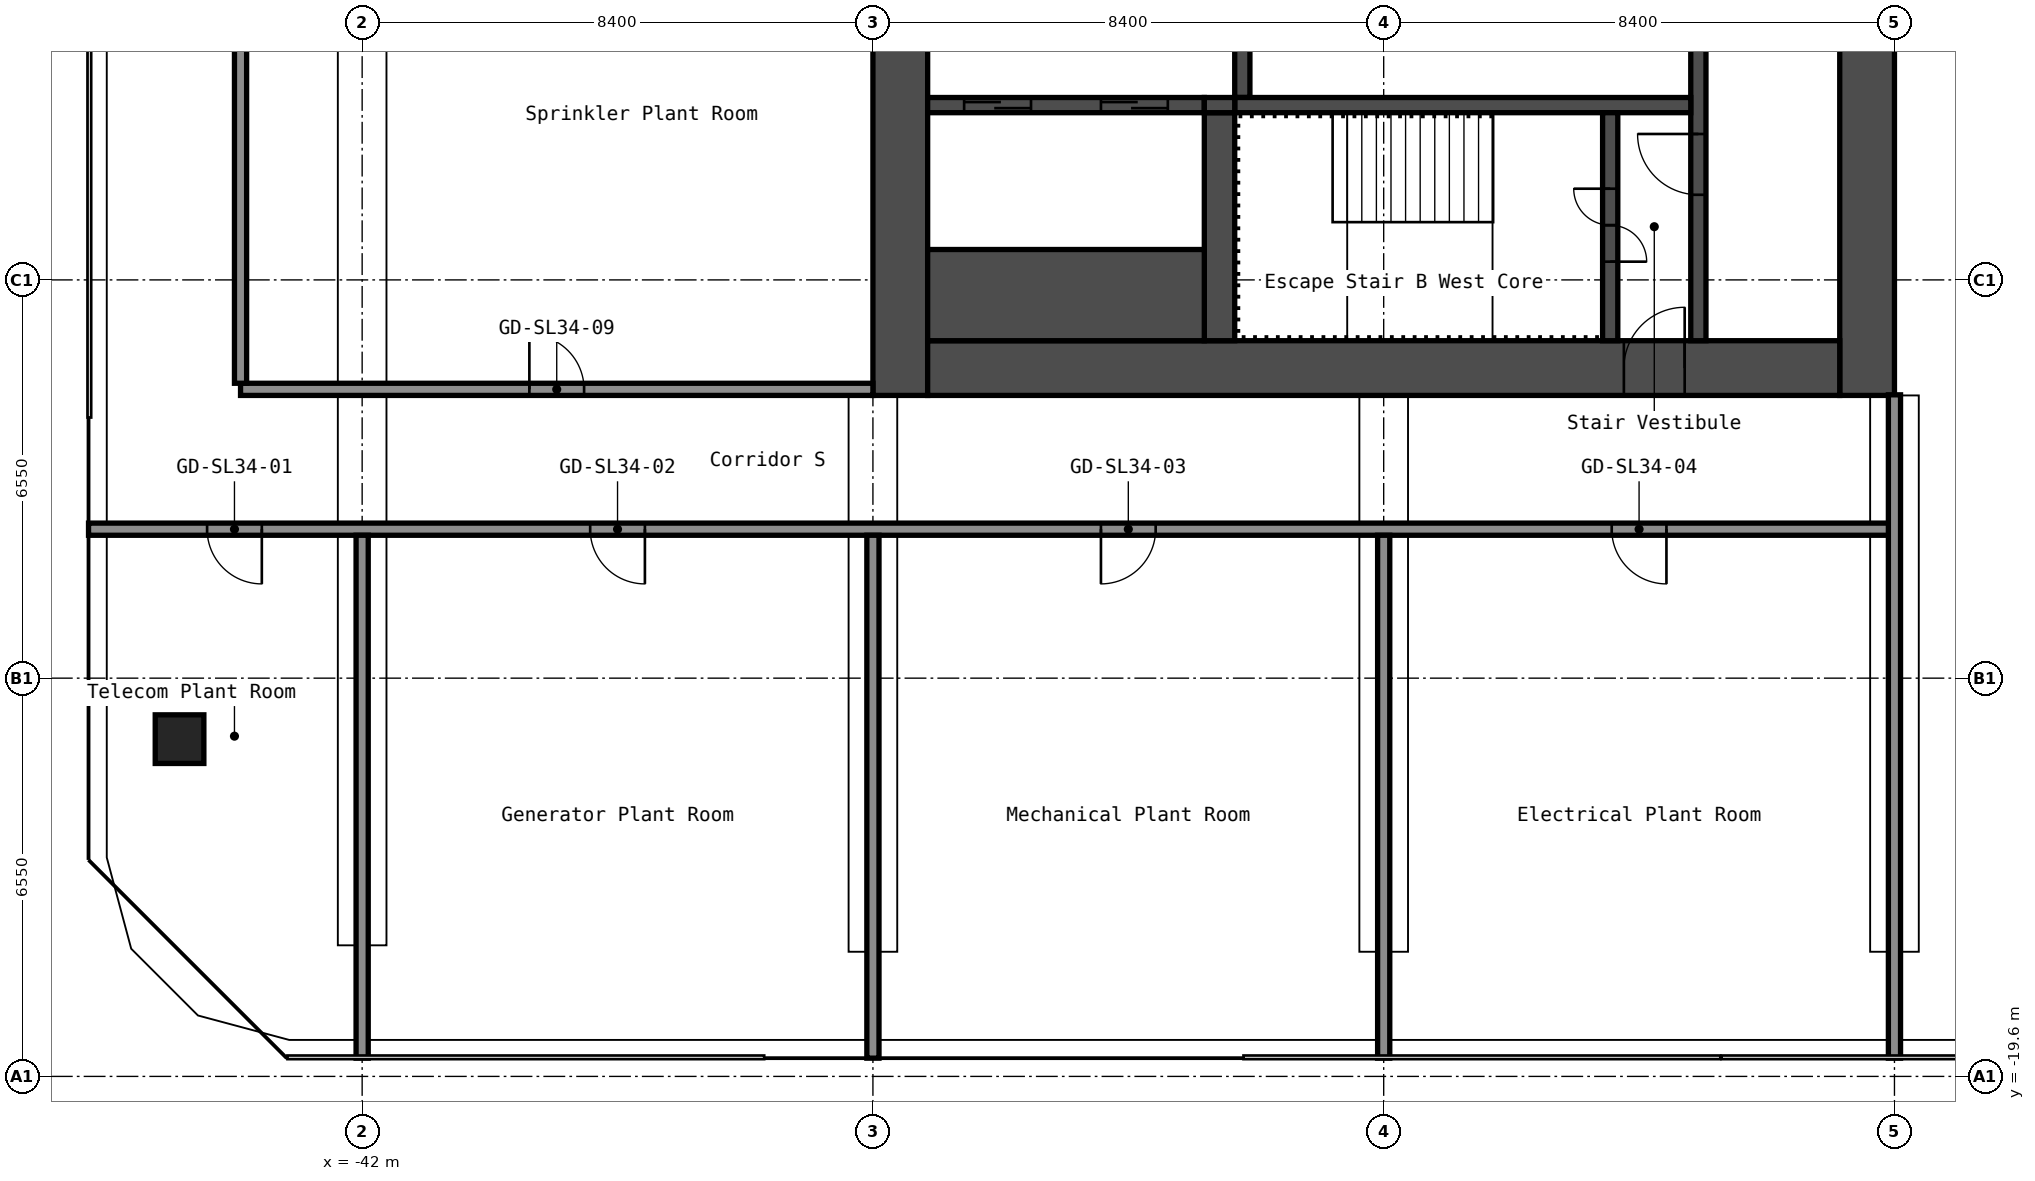
"""IFC4 building model, lengths in metres.
Left out: names, types, materials, properties, quantities, classifications, styles, units other than length and angle.
Written with IfcOpenShell. Run it as: python <this file> out.ifc"""

import sys

from ifc_helpers import new_model, si_unit, direction, frame, frame_2d, origin, origin_2d, place, context, subcontext, project, spatial, rectangle, hollow_rectangle, extrude, element, fill, save


model = new_model("IFC4")
c1 = context("Model", 3, precision=1e-05, world=origin(), true_north=direction((0.0, 1.0)))
c2 = subcontext(c1, "Body", "Model", "MODEL_VIEW")
j1 = project(units=[si_unit("LENGTHUNIT", "METRE"), si_unit("PLANEANGLEUNIT", "RADIAN")], contexts=[c1])
p1 = place(None, origin())
s1 = spatial("IfcSite", under=j1, at=p1, CompositionType="ELEMENT")
p2 = place(p1, origin())
s2 = spatial("IfcBuilding", under=s1, at=p2, CompositionType="ELEMENT")
p3 = place(p2, frame((0.0, 0.0, 120.2)))
s3 = spatial("IfcBuildingStorey", under=s2, at=p3, CompositionType="ELEMENT", Elevation=120.2)
p4 = place(p3, frame((-45.003, -14.053, 0.0), z_axis=(0.0, 0.0, 1.0), x_axis=(1.0, 0.0, 0.0)))
e1 = element("IfcColumn", 1, at=p4, inside=s3, PredefinedType="COLUMN", context=c2, shape_type="SweptSolid", body=[
    extrude(hollow_rectangle(XDim=0.8, YDim=0.8, WallThickness=0.032, at=origin_2d()), origin(), (0.0, 0.0, 1.0), 4.1),
])
p5 = place(p3, frame((-17.25, -8.4, 0.0), z_axis=(0.0, 0.0, 1.0), x_axis=(0.0, 1.0, 0.0)))
e2 = element("IfcWall", 2, at=p5, inside=s3, PredefinedType="SHEAR", context=c2, shape_type="SweptSolid", body=[
    extrude(rectangle(XDim=16.8, YDim=0.9, at=frame_2d((8.4, 0.0))), origin(), (0.0, 0.0, 1.0), 4.1),
])
p6 = place(p5, frame((7.1, 0.0, 0.0)))
e3 = element("IfcOpeningElement", 3, at=p6, cuts=e2, PredefinedType="OPENING", context=c2, shape_type="SweptSolid", body=[
    extrude(rectangle(XDim=1.6, YDim=2.1, at=frame_2d((0.8, 1.05))), frame((0.0, 0.46, 0.0), z_axis=(0.0, -1.0, 0.0), x_axis=(1.0, 0.0, 0.0)), (0.0, 0.0, 1.0), 0.92),
])
p7 = place(p3, frame((-33.15, -8.4, 0.0), z_axis=(0.0, 0.0, 1.0), x_axis=(0.0, 1.0, 0.0)))
e4 = element("IfcWall", 4, at=p7, inside=s3, PredefinedType="SHEAR", context=c2, shape_type="SweptSolid", body=[
    extrude(rectangle(XDim=16.8, YDim=0.9, at=frame_2d((8.4, 0.0))), origin(), (0.0, 0.0, 1.0), 4.1),
])
p8 = place(p3, frame((-32.7, -7.95, 0.0), z_axis=(0.0, 0.0, 1.0), x_axis=(1.0, 0.0, 0.0)))
e5 = element("IfcWall", 5, at=p8, inside=s3, PredefinedType="SHEAR", context=c2, shape_type="SweptSolid", body=[
    extrude(rectangle(XDim=15.0, YDim=0.9, at=frame_2d((7.5, 0.0))), origin(), (0.0, 0.0, 1.0), 4.1),
])
p9 = place(p8, frame((11.45, 0.0, 0.0)))
e6 = element("IfcOpeningElement", 6, at=p9, cuts=e5, PredefinedType="OPENING", context=c2, shape_type="SweptSolid", body=[
    extrude(rectangle(XDim=1.0, YDim=2.1, at=frame_2d((0.5, 1.05))), frame((0.0, 0.46, 0.0), z_axis=(0.0, -1.0, 0.0), x_axis=(1.0, 0.0, 0.0)), (0.0, 0.0, 1.0), 0.92),
])
p10 = place(p3, frame((-20.025, -7.5, 0.0), z_axis=(0.0, 0.0, 1.0), x_axis=(0.0, 1.0, 0.0)))
e7 = element("IfcWall", 7, at=p10, inside=s3, PredefinedType="SHEAR", context=c2, shape_type="SweptSolid", body=[
    extrude(rectangle(XDim=6.3, YDim=0.25, at=frame_2d((3.15, 0.0))), origin(), (0.0, 0.0, 1.0), 4.1),
])
p11 = place(p10, frame((2.4, 0.0, 0.0)))
e8 = element("IfcOpeningElement", 8, at=p11, cuts=e7, PredefinedType="OPENING", context=c2, shape_type="SweptSolid", body=[
    extrude(rectangle(XDim=1.0, YDim=2.1, at=frame_2d((0.5, 1.05))), frame((0.0, 0.135, 0.0), z_axis=(0.0, -1.0, 0.0), x_axis=(1.0, 0.0, 0.0)), (0.0, 0.0, 1.0), 0.27),
])
p12 = place(p3, frame((-27.525, -3.5, 0.0), z_axis=(0.0, 0.0, 1.0), x_axis=(0.0, 1.0, 0.0)))
e9 = element("IfcWall", 9, at=p12, inside=s3, PredefinedType="SHEAR", context=c2, shape_type="SweptSolid", body=[
    extrude(rectangle(XDim=2.05, YDim=0.25, at=frame_2d((1.025, 0.0))), origin(), (0.0, 0.0, 1.0), 4.1),
])
p13 = place(p3, frame((-27.65, -3.625, 0.0), z_axis=(0.0, 0.0, 1.0), x_axis=(1.0, 0.0, 0.0)))
e10 = element("IfcWall", 10, at=p13, inside=s3, PredefinedType="SHEAR", context=c2, shape_type="SweptSolid", body=[
    extrude(rectangle(XDim=7.5, YDim=0.25, at=frame_2d((3.75, 0.0))), origin(), (0.0, 0.0, 1.0), 4.1),
])
p14 = place(p3, frame((-21.475, -7.5, 0.0), z_axis=(0.0, 0.0, 1.0), x_axis=(0.0, 1.0, 0.0)))
e11 = element("IfcWall", 11, at=p14, inside=s3, PredefinedType="SHEAR", context=c2, shape_type="SweptSolid", body=[
    extrude(rectangle(XDim=3.75, YDim=0.25, at=frame_2d((1.875, 0.0))), origin(), (0.0, 0.0, 1.0), 4.1),
])
p15 = place(p14, frame((1.3, 0.0, 0.0)))
e12 = element("IfcOpeningElement", 12, at=p15, cuts=e11, PredefinedType="OPENING", context=c2, shape_type="SweptSolid", body=[
    extrude(rectangle(XDim=1.2, YDim=2.1, at=frame_2d((0.6, 1.05))), frame((0.0, 0.135, 0.0), z_axis=(0.0, -1.0, 0.0), x_axis=(1.0, 0.0, 0.0)), (0.0, 0.0, 1.0), 0.27),
])
p16 = place(p3, frame((-27.9, -7.5, 0.0), z_axis=(0.0, 0.0, 1.0), x_axis=(0.0, 1.0, 0.0)))
e13 = element("IfcWall", 13, at=p16, inside=s3, PredefinedType="SHEAR", context=c2, shape_type="SweptSolid", body=[
    extrude(rectangle(XDim=3.75, YDim=0.5, at=frame_2d((1.875, 0.0))), origin(), (0.0, 0.0, 1.0), 4.1),
])
p17 = place(p3, frame((-32.7, -3.625, 0.0), z_axis=(0.0, 0.0, 1.0), x_axis=(1.0, 0.0, 0.0)))
e14 = element("IfcWall", 14, at=p17, inside=s3, PredefinedType="SHEAR", context=c2, shape_type="SweptSolid", body=[
    extrude(rectangle(XDim=4.55, YDim=0.25, at=frame_2d((2.275, 0.0))), origin(), (0.0, 0.0, 1.0), 4.1),
])
p18 = place(p17, frame((2.85, 0.0, 0.0)))
e15 = element("IfcOpeningElement", 15, at=p18, cuts=e14, PredefinedType="OPENING", context=c2, shape_type="SweptSolid", body=[
    extrude(rectangle(XDim=1.1, YDim=2.1, at=frame_2d((0.55, 1.05))), frame((0.0, 0.135, 0.0), z_axis=(0.0, -1.0, 0.0), x_axis=(1.0, 0.0, 0.0)), (0.0, 0.0, 1.0), 0.27),
])
p19 = place(p17, frame((0.6, 0.0, 0.0)))
e16 = element("IfcOpeningElement", 16, at=p19, cuts=e14, PredefinedType="OPENING", context=c2, shape_type="SweptSolid", body=[
    extrude(rectangle(XDim=1.1, YDim=2.1, at=frame_2d((0.55, 1.05))), frame((0.0, 0.135, 0.0), z_axis=(0.0, -1.0, 0.0), x_axis=(1.0, 0.0, 0.0)), (0.0, 0.0, 1.0), 0.27),
])
p20 = place(p3, frame((-32.7, -6.75, 0.0), z_axis=(0.0, 0.0, 1.0), x_axis=(1.0, 0.0, 0.0)))
e17 = element("IfcWall", 17, at=p20, inside=s3, PredefinedType="SHEAR", context=c2, shape_type="SweptSolid", body=[
    extrude(rectangle(XDim=4.55, YDim=1.5, at=frame_2d((2.275, 0.0))), origin(), (0.0, 0.0, 1.0), 4.1),
])
p21 = place(p3, frame((-28.15, -3.625, 0.0), z_axis=(0.0, 0.0, 1.0), x_axis=(1.0, 0.0, 0.0)))
e18 = element("IfcWall", 18, at=p21, inside=s3, PredefinedType="SHEAR", context=c2, shape_type="SweptSolid", body=[
    extrude(rectangle(XDim=0.5, YDim=0.25, at=frame_2d((0.25, 0.0))), origin(), (0.0, 0.0, 1.0), 4.1),
])
p22 = place(p3, frame((-46.5, -10.6, 0.0), z_axis=(0.0, 0.0, 1.0), x_axis=(1.0, 0.0, 0.0)))
e19 = element("IfcWall", 19, at=p22, inside=s3, PredefinedType="PARTITIONING", context=c2, shape_type="SweptSolid", body=[
    extrude(rectangle(XDim=29.7, YDim=0.2, at=frame_2d((14.85, 0.0))), origin(), (0.0, 0.0, 1.0), 4.1),
])
p23 = place(p22, frame((1.95, 0.0, 0.0)))
e20 = element("IfcOpeningElement", 20, at=p23, cuts=e19, PredefinedType="OPENING", context=c2, shape_type="SweptSolid", body=[
    extrude(rectangle(XDim=0.9, YDim=2.1, at=frame_2d((0.45, 1.05))), frame((0.0, 0.11, 0.0), z_axis=(0.0, -1.0, 0.0), x_axis=(1.0, 0.0, 0.0)), (0.0, 0.0, 1.0), 0.22),
])
p24 = place(p22, frame((8.25, 0.0, 0.0)))
e21 = element("IfcOpeningElement", 21, at=p24, cuts=e19, PredefinedType="OPENING", context=c2, shape_type="SweptSolid", body=[
    extrude(rectangle(XDim=0.9, YDim=2.1, at=frame_2d((0.45, 1.05))), frame((0.0, 0.11, 0.0), z_axis=(0.0, -1.0, 0.0), x_axis=(1.0, 0.0, 0.0)), (0.0, 0.0, 1.0), 0.22),
])
p25 = place(p22, frame((16.65, 0.0, 0.0)))
e22 = element("IfcOpeningElement", 22, at=p25, cuts=e19, PredefinedType="OPENING", context=c2, shape_type="SweptSolid", body=[
    extrude(rectangle(XDim=0.9, YDim=2.1, at=frame_2d((0.45, 1.05))), frame((0.0, 0.11, 0.0), z_axis=(0.0, -1.0, 0.0), x_axis=(1.0, 0.0, 0.0)), (0.0, 0.0, 1.0), 0.22),
])
p26 = place(p22, frame((25.05, 0.0, 0.0)))
e23 = element("IfcOpeningElement", 23, at=p26, cuts=e19, PredefinedType="OPENING", context=c2, shape_type="SweptSolid", body=[
    extrude(rectangle(XDim=0.9, YDim=2.1, at=frame_2d((0.45, 1.05))), frame((0.0, 0.11, 0.0), z_axis=(0.0, -1.0, 0.0), x_axis=(1.0, 0.0, 0.0)), (0.0, 0.0, 1.0), 0.22),
])
p27 = place(p3, frame((-44.0, -8.3, 0.0), z_axis=(0.0, 0.0, 1.0), x_axis=(1.0, 0.0, 0.0)))
e24 = element("IfcWall", 24, at=p27, inside=s3, PredefinedType="PARTITIONING", context=c2, shape_type="SweptSolid", body=[
    extrude(rectangle(XDim=10.4, YDim=0.2, at=frame_2d((5.2, 0.0))), origin(), (0.0, 0.0, 1.0), 4.1),
])
p28 = place(p27, frame((4.75, 0.0, 0.0)))
e25 = element("IfcOpeningElement", 25, at=p28, cuts=e24, PredefinedType="OPENING", context=c2, shape_type="SweptSolid", body=[
    extrude(rectangle(XDim=0.9, YDim=2.1, at=frame_2d((0.45, 1.05))), frame((0.0, 0.11, 0.0), z_axis=(0.0, -1.0, 0.0), x_axis=(1.0, 0.0, 0.0)), (0.0, 0.0, 1.0), 0.22),
])
p29 = place(p3, frame((-44.0, -8.2, 0.0), z_axis=(0.0, 0.0, 1.0), x_axis=(0.0, 1.0, 0.0)))
e26 = element("IfcWall", 26, at=p29, inside=s3, PredefinedType="PARTITIONING", context=c2, shape_type="SweptSolid", body=[
    extrude(rectangle(XDim=16.4, YDim=0.2, at=frame_2d((8.2, 0.0))), origin(), (0.0, 0.0, 1.0), 4.1),
])
for number, where, z_axis, x_axis in (
    (27, (-42.0, -19.3, 0.0), (0.0, 0.0, 1.0), (0.0, 1.0, 0.0)),
    (28, (-33.6, -19.3, 0.0), (0.0, 0.0, 1.0), (0.0, 1.0, 0.0)),
    (29, (-25.2, -19.3, 0.0), (0.0, 0.0, 1.0), (0.0, 1.0, 0.0)),
):
    element("IfcWall", number, at=place(p3, frame(where, z_axis=z_axis, x_axis=x_axis)), inside=s3, PredefinedType="PARTITIONING", context=c2, shape_type="SweptSolid", body=[
        extrude(rectangle(XDim=8.6, YDim=0.2, at=frame_2d((4.3, 0.0))), origin(), (0.0, 0.0, 1.0), 4.1),
    ])
p30 = place(p3, frame((-16.8, -19.3, 0.0), z_axis=(0.0, 0.0, 1.0), x_axis=(0.0, 1.0, 0.0)))
e30 = element("IfcWall", 30, at=p30, inside=s3, PredefinedType="PARTITIONING", context=c2, shape_type="SweptSolid", body=[
    extrude(rectangle(XDim=10.91, YDim=0.2, at=frame_2d((5.455, 0.0))), origin(), (0.0, 0.0, 1.0), 4.1),
])
p31 = place(p9, origin())
e31 = element("IfcDoor", 31, at=p31, inside=s3, OperationType="SINGLE_SWING_LEFT", PredefinedType="DOOR", context=c2, shape_type="SweptSolid", body=[
    extrude(rectangle(XDim=1.0, YDim=2.1, at=frame_2d((0.5, 1.05))), frame((0.0, 0.025, 0.0), z_axis=(0.0, -1.0, 0.0), x_axis=(1.0, 0.0, 0.0)), (0.0, 0.0, 1.0), 0.05),
])
fill(e6, e31)
p32 = place(p15, origin())
e32 = element("IfcDoor", 32, at=p32, inside=s3, OperationType="DOUBLE_DOOR_SINGLE_SWING", PredefinedType="DOOR", context=c2, shape_type="SweptSolid", body=[
    extrude(rectangle(XDim=1.2, YDim=2.1, at=frame_2d((0.6, 1.05))), frame((0.0, 0.025, 0.0), z_axis=(0.0, -1.0, 0.0), x_axis=(1.0, 0.0, 0.0)), (0.0, 0.0, 1.0), 0.05),
])
fill(e12, e32)
p33 = place(p11, origin())
e33 = element("IfcDoor", 33, at=p33, inside=s3, OperationType="SINGLE_SWING_LEFT", PredefinedType="DOOR", context=c2, shape_type="SweptSolid", body=[
    extrude(rectangle(XDim=1.0, YDim=2.1, at=frame_2d((0.5, 1.05))), frame((0.0, 0.025, 0.0), z_axis=(0.0, -1.0, 0.0), x_axis=(1.0, 0.0, 0.0)), (0.0, 0.0, 1.0), 0.05),
])
fill(e8, e33)
p34 = place(p18, origin())
e34 = element("IfcDoor", 34, at=p34, inside=s3, OperationType="DOUBLE_DOOR_SLIDING", PredefinedType="DOOR", context=c2, shape_type="SweptSolid", body=[
    extrude(rectangle(XDim=1.1, YDim=2.1, at=frame_2d((0.55, 1.05))), frame((0.0, 0.025, 0.0), z_axis=(0.0, -1.0, 0.0), x_axis=(1.0, 0.0, 0.0)), (0.0, 0.0, 1.0), 0.05),
])
fill(e15, e34)
p35 = place(p19, origin())
e35 = element("IfcDoor", 35, at=p35, inside=s3, OperationType="DOUBLE_DOOR_SLIDING", PredefinedType="DOOR", context=c2, shape_type="SweptSolid", body=[
    extrude(rectangle(XDim=1.1, YDim=2.1, at=frame_2d((0.55, 1.05))), frame((0.0, 0.025, 0.0), z_axis=(0.0, -1.0, 0.0), x_axis=(1.0, 0.0, 0.0)), (0.0, 0.0, 1.0), 0.05),
])
fill(e16, e35)
p36 = place(p23, origin())
e36 = element("IfcDoor", 36, at=p36, inside=s3, OperationType="SINGLE_SWING_RIGHT", PredefinedType="DOOR", context=c2, shape_type="SweptSolid", body=[
    extrude(rectangle(XDim=0.9, YDim=2.1, at=frame_2d((0.45, 1.05))), frame((0.0, 0.025, 0.0), z_axis=(0.0, -1.0, 0.0), x_axis=(1.0, 0.0, 0.0)), (0.0, 0.0, 1.0), 0.05),
])
fill(e20, e36)
p37 = place(p24, origin())
e37 = element("IfcDoor", 37, at=p37, inside=s3, OperationType="SINGLE_SWING_RIGHT", PredefinedType="DOOR", context=c2, shape_type="SweptSolid", body=[
    extrude(rectangle(XDim=0.9, YDim=2.1, at=frame_2d((0.45, 1.05))), frame((0.0, 0.025, 0.0), z_axis=(0.0, -1.0, 0.0), x_axis=(1.0, 0.0, 0.0)), (0.0, 0.0, 1.0), 0.05),
])
fill(e21, e37)
p38 = place(p25, origin())
e38 = element("IfcDoor", 38, at=p38, inside=s3, OperationType="SINGLE_SWING_LEFT", PredefinedType="DOOR", context=c2, shape_type="SweptSolid", body=[
    extrude(rectangle(XDim=0.9, YDim=2.1, at=frame_2d((0.45, 1.05))), frame((0.0, 0.025, 0.0), z_axis=(0.0, -1.0, 0.0), x_axis=(1.0, 0.0, 0.0)), (0.0, 0.0, 1.0), 0.05),
])
fill(e22, e38)
p39 = place(p26, origin())
e39 = element("IfcDoor", 39, at=p39, inside=s3, OperationType="SINGLE_SWING_RIGHT", PredefinedType="DOOR", context=c2, shape_type="SweptSolid", body=[
    extrude(rectangle(XDim=0.9, YDim=2.1, at=frame_2d((0.45, 1.05))), frame((0.0, 0.025, 0.0), z_axis=(0.0, -1.0, 0.0), x_axis=(1.0, 0.0, 0.0)), (0.0, 0.0, 1.0), 0.05),
])
fill(e23, e39)
p40 = place(p28, origin())
e40 = element("IfcDoor", 40, at=p40, inside=s3, OperationType="SINGLE_SWING_RIGHT", PredefinedType="DOOR", context=c2, shape_type="SweptSolid", body=[
    extrude(rectangle(XDim=0.9, YDim=2.1, at=frame_2d((0.45, 1.05))), frame((0.0, 0.025, 0.0), z_axis=(0.0, -1.0, 0.0), x_axis=(1.0, 0.0, 0.0)), (0.0, 0.0, 1.0), 0.05),
])
fill(e25, e40)
save(model, sys.argv[1])
